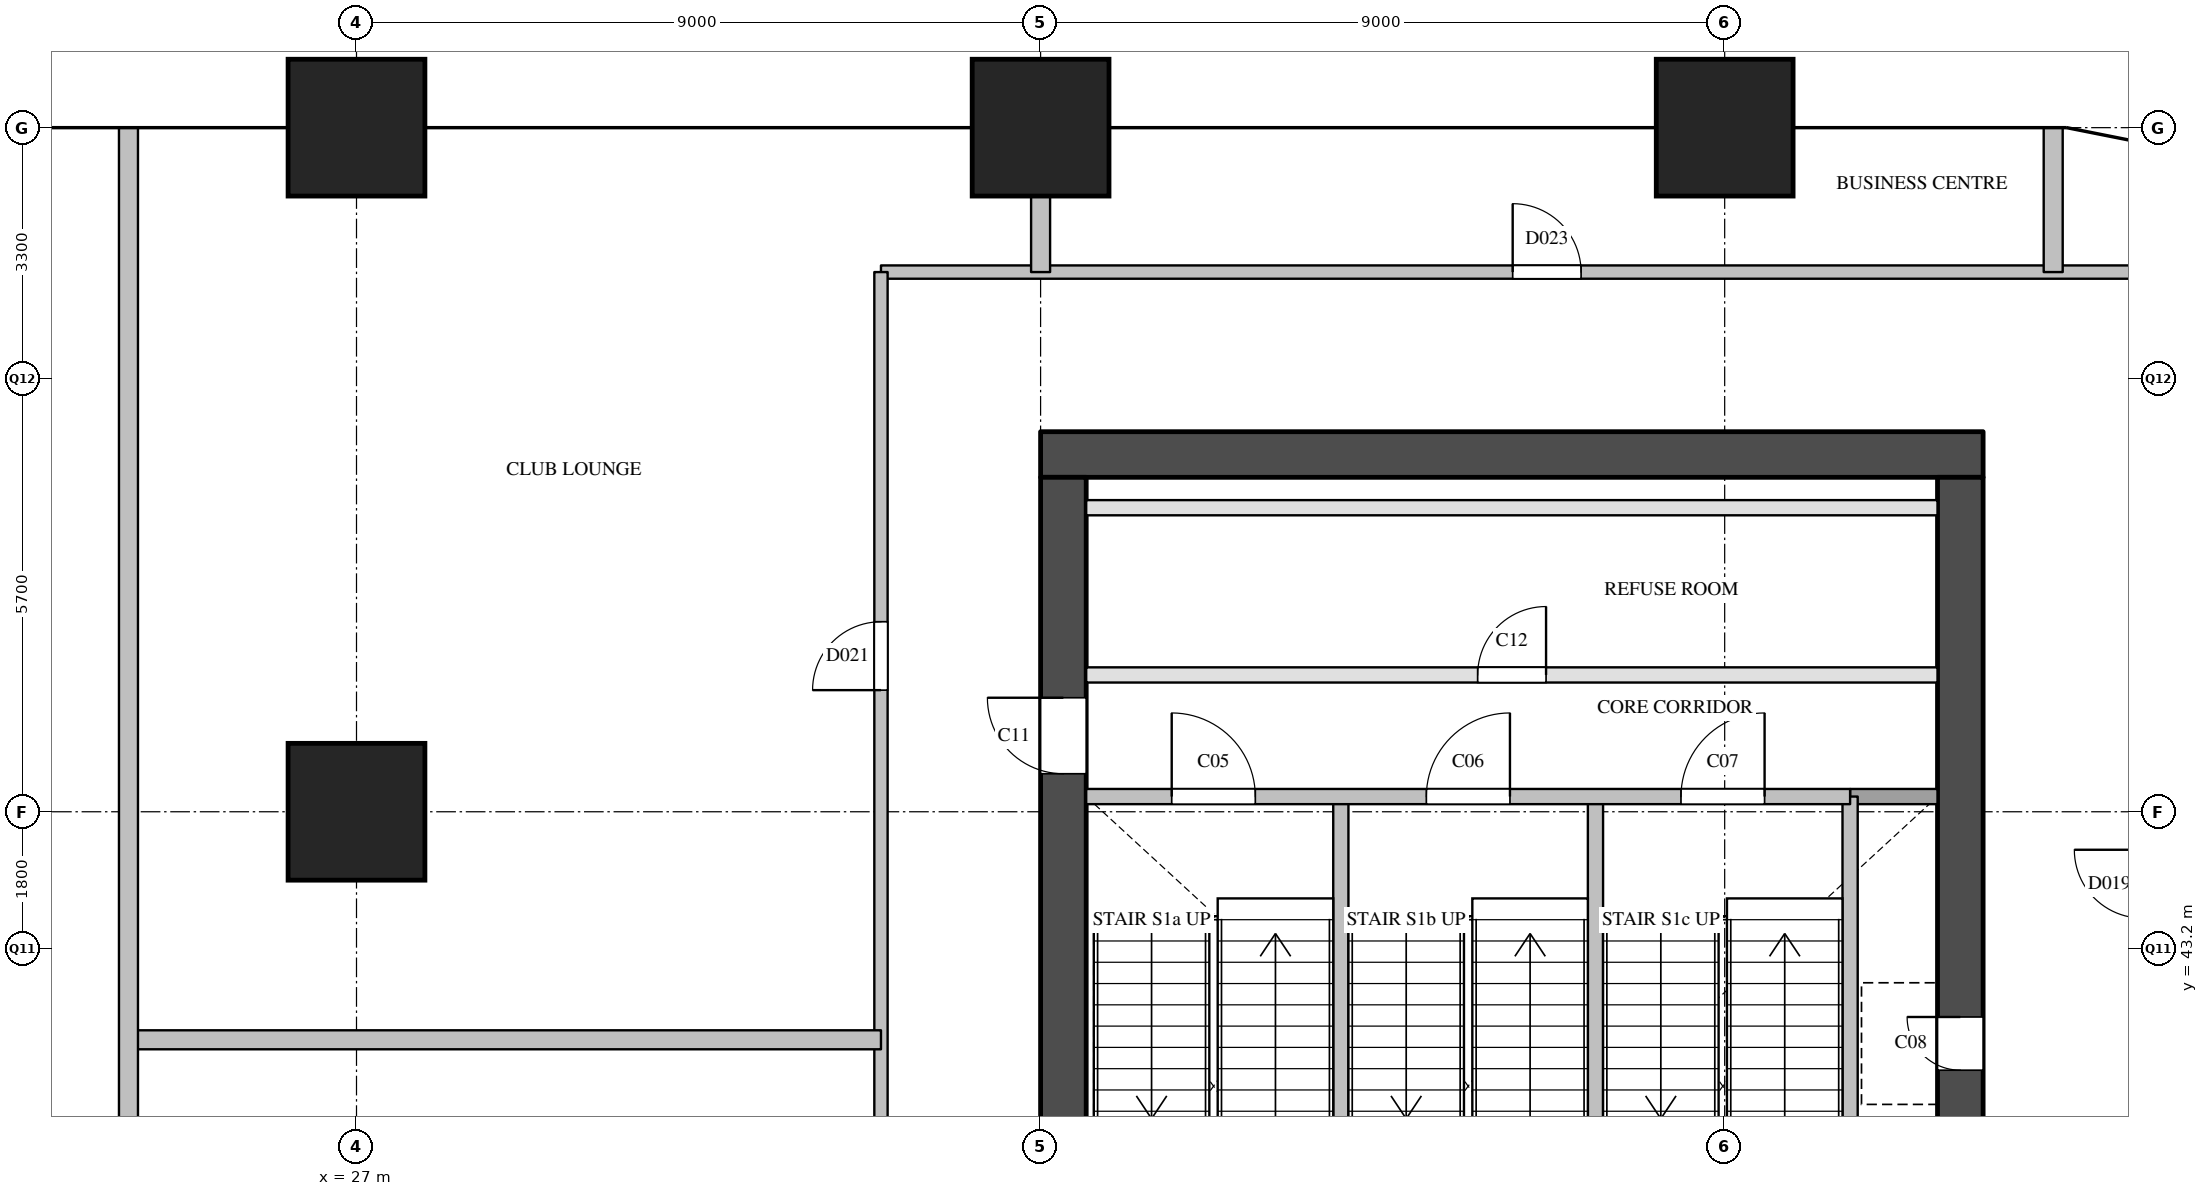
"""IFC4 building model, lengths in metres.
Left out: names, types, materials, properties, quantities, classifications, styles, units other than length and angle.
Written with IfcOpenShell. Run it as: python <this file> out.ifc"""

import sys

from ifc_helpers import new_model, si_unit, direction, frame, frame_2d, origin, origin_2d, place, context, subcontext, project, spatial, rectangle, extrude, element, fill, save


model = new_model("IFC4")
c1 = context("Model", 3, precision=1e-05, world=origin(), true_north=direction((0.0, 1.0)))
c2 = subcontext(c1, "Body", "Model", "MODEL_VIEW")
j1 = project(units=[si_unit("LENGTHUNIT", "METRE"), si_unit("PLANEANGLEUNIT", "RADIAN")], contexts=[c1])
p1 = place(None, origin())
s1 = spatial("IfcSite", under=j1, at=p1, CompositionType="ELEMENT")
p2 = place(p1, origin())
s2 = spatial("IfcBuilding", under=s1, at=p2, CompositionType="ELEMENT")
p3 = place(p2, frame((0.0, 0.0, 93.0)))
s3 = spatial("IfcBuildingStorey", under=s2, at=p3, CompositionType="ELEMENT", Elevation=93.0)
for number, where, z_axis, x_axis in (
    (1, (27.0, 45.0, 0.0), (0.0, 0.0, 1.0), (1.0, 0.0, 0.0)),
    (2, (27.0, 54.0, 0.0), (0.0, 0.0, 1.0), (1.0, 0.0, 0.0)),
    (3, (36.0, 54.0, 0.0), (0.0, 0.0, 1.0), (1.0, 0.0, 0.0)),
    (4, (45.0, 54.0, 0.0), (0.0, 0.0, 1.0), (1.0, 0.0, 0.0)),
):
    element("IfcColumn", number, at=place(p3, frame(where, z_axis=z_axis, x_axis=x_axis)), inside=s3, PredefinedType="COLUMN", context=c2, shape_type="SweptSolid", body=[
        extrude(rectangle(XDim=1.8, YDim=1.8, at=origin_2d()), origin(), (0.0, 0.0, 1.0), 3.8),
    ])
p4 = place(p3, frame((36.0, 49.7, 0.0), z_axis=(0.0, 0.0, 1.0), x_axis=(1.0, 0.0, 0.0)))
e5 = element("IfcWall", 5, at=p4, inside=s3, PredefinedType="SHEAR", context=c2, shape_type="SweptSolid", body=[
    extrude(rectangle(XDim=12.4, YDim=0.6, at=frame_2d((6.2, 0.0))), origin(), (0.0, 0.0, 1.0), 3.5),
])
p5 = place(p3, frame((36.3, 29.1, 0.0), z_axis=(0.0, 0.0, 1.0), x_axis=(0.0, 1.0, 0.0)))
e6 = element("IfcWall", 6, at=p5, inside=s3, PredefinedType="SHEAR", context=c2, shape_type="SweptSolid", body=[
    extrude(rectangle(XDim=20.3, YDim=0.6, at=frame_2d((10.15, 0.0))), origin(), (0.0, 0.0, 1.0), 3.5),
])
p6 = place(p5, frame((3.6, 0.0, 0.0)))
e7 = element("IfcOpeningElement", 7, at=p6, cuts=e6, PredefinedType="OPENING", context=c2, shape_type="SweptSolid", body=[
    extrude(rectangle(XDim=1.8, YDim=2.1, at=frame_2d((0.9, 1.05))), frame((0.0, 0.31, 0.0), z_axis=(0.0, -1.0, 0.0), x_axis=(1.0, 0.0, 0.0)), (0.0, 0.0, 1.0), 0.62),
])
p7 = place(p5, frame((16.4, 0.0, 0.0)))
e8 = element("IfcOpeningElement", 8, at=p7, cuts=e6, PredefinedType="OPENING", context=c2, shape_type="SweptSolid", body=[
    extrude(rectangle(XDim=1.0, YDim=2.1, at=frame_2d((0.5, 1.05))), frame((0.0, 0.31, 0.0), z_axis=(0.0, -1.0, 0.0), x_axis=(1.0, 0.0, 0.0)), (0.0, 0.0, 1.0), 0.62),
])
p8 = place(p3, frame((48.1, 29.1, 0.0), z_axis=(0.0, 0.0, 1.0), x_axis=(0.0, 1.0, 0.0)))
e9 = element("IfcWall", 9, at=p8, inside=s3, PredefinedType="SHEAR", context=c2, shape_type="SweptSolid", body=[
    extrude(rectangle(XDim=20.3, YDim=0.6, at=frame_2d((10.15, 0.0))), origin(), (0.0, 0.0, 1.0), 3.5),
])
p9 = place(p8, frame((12.5, 0.0, 0.0)))
e10 = element("IfcOpeningElement", 10, at=p9, cuts=e9, PredefinedType="OPENING", context=c2, shape_type="SweptSolid", body=[
    extrude(rectangle(XDim=0.7, YDim=2.1, at=frame_2d((0.35, 1.05))), frame((0.0, 0.31, 0.0), z_axis=(0.0, -1.0, 0.0), x_axis=(1.0, 0.0, 0.0)), (0.0, 0.0, 1.0), 0.62),
])
p10 = place(p8, frame((3.9, 0.0, 0.0)))
e11 = element("IfcOpeningElement", 11, at=p10, cuts=e9, PredefinedType="OPENING", context=c2, shape_type="SweptSolid", body=[
    extrude(rectangle(XDim=1.8, YDim=2.1, at=frame_2d((0.9, 1.05))), frame((0.0, 0.31, 0.0), z_axis=(0.0, -1.0, 0.0), x_axis=(1.0, 0.0, 0.0)), (0.0, 0.0, 1.0), 0.62),
])
for number, where, z_axis, x_axis in (
    (12, (39.95, 40.78, 0.0), (0.0, 0.0, 1.0), (0.0, 1.0, 0.0)),
    (13, (43.3, 40.78, 0.0), (0.0, 0.0, 1.0), (0.0, 1.0, 0.0)),
    (14, (46.65, 40.78, 0.0), (0.0, 0.0, 1.0), (0.0, 1.0, 0.0)),
):
    element("IfcWall", number, at=place(p3, frame(where, z_axis=z_axis, x_axis=x_axis)), inside=s3, PredefinedType="SOLIDWALL", context=c2, shape_type="SweptSolid", body=[
        extrude(rectangle(XDim=4.42, YDim=0.2, at=frame_2d((2.21, 0.0))), origin(), (0.0, 0.0, 1.0), 3.5),
    ])
p11 = place(p3, frame((46.65, 45.2, 0.0), z_axis=(0.0, 0.0, 1.0), x_axis=(1.0, 0.0, 0.0)))
e15 = element("IfcWall", 15, at=p11, inside=s3, PredefinedType="SOLIDWALL", context=c2, shape_type="SweptSolid", body=[
    extrude(rectangle(XDim=1.15, YDim=0.2, at=frame_2d((0.575, 0.0))), origin(), (0.0, 0.0, 1.0), 3.5),
])
p12 = place(p3, frame((36.6, 45.2, 0.0), z_axis=(0.0, 0.0, 1.0), x_axis=(1.0, 0.0, 0.0)))
e16 = element("IfcWall", 16, at=p12, inside=s3, PredefinedType="SOLIDWALL", context=c2, shape_type="SweptSolid", body=[
    extrude(rectangle(XDim=10.05, YDim=0.2, at=frame_2d((5.025, 0.0))), origin(), (0.0, 0.0, 1.0), 3.5),
])
p13 = place(p12, frame((1.125, 0.0, 0.0)))
e17 = element("IfcOpeningElement", 17, at=p13, cuts=e16, PredefinedType="OPENING", context=c2, shape_type="SweptSolid", body=[
    extrude(rectangle(XDim=1.1, YDim=2.1, at=frame_2d((0.55, 1.05))), frame((0.0, 0.11, 0.0), z_axis=(0.0, -1.0, 0.0), x_axis=(1.0, 0.0, 0.0)), (0.0, 0.0, 1.0), 0.22),
])
p14 = place(p12, frame((4.475, 0.0, 0.0)))
e18 = element("IfcOpeningElement", 18, at=p14, cuts=e16, PredefinedType="OPENING", context=c2, shape_type="SweptSolid", body=[
    extrude(rectangle(XDim=1.1, YDim=2.1, at=frame_2d((0.55, 1.05))), frame((0.0, 0.11, 0.0), z_axis=(0.0, -1.0, 0.0), x_axis=(1.0, 0.0, 0.0)), (0.0, 0.0, 1.0), 0.22),
])
p15 = place(p12, frame((7.825, 0.0, 0.0)))
e19 = element("IfcOpeningElement", 19, at=p15, cuts=e16, PredefinedType="OPENING", context=c2, shape_type="SweptSolid", body=[
    extrude(rectangle(XDim=1.1, YDim=2.1, at=frame_2d((0.55, 1.05))), frame((0.0, 0.11, 0.0), z_axis=(0.0, -1.0, 0.0), x_axis=(1.0, 0.0, 0.0)), (0.0, 0.0, 1.0), 0.22),
])
p16 = place(p3, frame((36.6, 46.8, 0.0), z_axis=(0.0, 0.0, 1.0), x_axis=(1.0, 0.0, 0.0)))
e20 = element("IfcWall", 20, at=p16, inside=s3, PredefinedType="PARTITIONING", context=c2, shape_type="SweptSolid", body=[
    extrude(rectangle(XDim=11.2, YDim=0.2, at=frame_2d((5.6, 0.0))), origin(), (0.0, 0.0, 1.0), 3.5),
])
p17 = place(p16, frame((5.15, 0.0, 0.0)))
e21 = element("IfcOpeningElement", 21, at=p17, cuts=e20, PredefinedType="OPENING", context=c2, shape_type="SweptSolid", body=[
    extrude(rectangle(XDim=0.9, YDim=2.1, at=frame_2d((0.45, 1.05))), frame((0.0, 0.11, 0.0), z_axis=(0.0, -1.0, 0.0), x_axis=(1.0, 0.0, 0.0)), (0.0, 0.0, 1.0), 0.22),
])
p18 = place(p3, frame((36.6, 49.0, 0.0), z_axis=(0.0, 0.0, 1.0), x_axis=(1.0, 0.0, 0.0)))
e22 = element("IfcWall", 22, at=p18, inside=s3, PredefinedType="PARTITIONING", context=c2, shape_type="SweptSolid", body=[
    extrude(rectangle(XDim=11.2, YDim=0.2, at=frame_2d((5.6, 0.0))), origin(), (0.0, 0.0, 1.0), 3.5),
])
p19 = place(p3, frame((33.9, 52.1, 0.0), z_axis=(0.0, 0.0, 1.0), x_axis=(1.0, 0.0, 0.0)))
e23 = element("IfcWall", 23, at=p19, inside=s3, PredefinedType="PARTITIONING", context=c2, shape_type="SweptSolid", body=[
    extrude(rectangle(XDim=16.6, YDim=0.175, at=frame_2d((8.3, 0.0))), origin(), (0.0, 0.0, 1.0), 3.5),
])
p20 = place(p19, frame((8.311, 0.0, 0.0)))
e24 = element("IfcOpeningElement", 24, at=p20, cuts=e23, PredefinedType="OPENING", context=c2, shape_type="SweptSolid", body=[
    extrude(rectangle(XDim=0.9, YDim=2.1, at=frame_2d((0.45, 1.05))), frame((0.0, 0.097, 0.0), z_axis=(0.0, -1.0, 0.0), x_axis=(1.0, 0.0, 0.0)), (0.0, 0.0, 1.0), 0.195),
])
p21 = place(p3, frame((33.9, 28.52, 0.0), z_axis=(0.0, 0.0, 1.0), x_axis=(0.0, 1.0, 0.0)))
e25 = element("IfcWall", 25, at=p21, inside=s3, PredefinedType="PARTITIONING", context=c2, shape_type="SweptSolid", body=[
    extrude(rectangle(XDim=23.58, YDim=0.175, at=frame_2d((11.79, 0.0))), origin(), (0.0, 0.0, 1.0), 3.5),
])
p22 = place(p21, frame((3.24, 0.0, 0.0)))
e26 = element("IfcOpeningElement", 26, at=p22, cuts=e25, PredefinedType="OPENING", context=c2, shape_type="SweptSolid", body=[
    extrude(rectangle(XDim=1.0, YDim=2.1, at=frame_2d((0.5, 1.05))), frame((0.0, 0.097, 0.0), z_axis=(0.0, -1.0, 0.0), x_axis=(1.0, 0.0, 0.0)), (0.0, 0.0, 1.0), 0.195),
])
p23 = place(p21, frame((9.98, 0.0, 0.0)))
e27 = element("IfcOpeningElement", 27, at=p23, cuts=e25, PredefinedType="OPENING", context=c2, shape_type="SweptSolid", body=[
    extrude(rectangle(XDim=1.0, YDim=2.1, at=frame_2d((0.5, 1.05))), frame((0.0, 0.097, 0.0), z_axis=(0.0, -1.0, 0.0), x_axis=(1.0, 0.0, 0.0)), (0.0, 0.0, 1.0), 0.195),
])
p24 = place(p21, frame((18.08, 0.0, 0.0)))
e28 = element("IfcOpeningElement", 28, at=p24, cuts=e25, PredefinedType="OPENING", context=c2, shape_type="SweptSolid", body=[
    extrude(rectangle(XDim=0.9, YDim=2.1, at=frame_2d((0.45, 1.05))), frame((0.0, 0.097, 0.0), z_axis=(0.0, -1.0, 0.0), x_axis=(1.0, 0.0, 0.0)), (0.0, 0.0, 1.0), 0.195),
])
p25 = place(p3, frame((24.0, 42.0, 0.0), z_axis=(0.0, 0.0, 1.0), x_axis=(1.0, 0.0, 0.0)))
e29 = element("IfcWall", 29, at=p25, inside=s3, PredefinedType="PARTITIONING", context=c2, shape_type="SweptSolid", body=[
    extrude(rectangle(XDim=9.9, YDim=0.25, at=frame_2d((4.95, 0.0))), origin(), (0.0, 0.0, 1.0), 2.5),
])
p26 = place(p3, frame((24.0, 36.0, 0.0), z_axis=(0.0, 0.0, 1.0), x_axis=(0.0, 1.0, 0.0)))
e30 = element("IfcWall", 30, at=p26, inside=s3, PredefinedType="PARTITIONING", context=c2, shape_type="SweptSolid", body=[
    extrude(rectangle(XDim=18.0, YDim=0.25, at=frame_2d((9.0, 0.0))), origin(), (0.0, 0.0, 1.0), 2.5),
])
p27 = place(p3, frame((36.0, 52.1, 0.0), z_axis=(0.0, 0.0, 1.0), x_axis=(0.0, 1.0, 0.0)))
e31 = element("IfcWall", 31, at=p27, inside=s3, PredefinedType="PARTITIONING", context=c2, shape_type="SweptSolid", body=[
    extrude(rectangle(XDim=1.9, YDim=0.25, at=frame_2d((0.95, 0.0))), origin(), (0.0, 0.0, 1.0), 3.5),
])
p28 = place(p3, frame((49.322, 52.1, 0.0), z_axis=(0.0, 0.0, 1.0), x_axis=(0.0, 1.0, 0.0)))
e32 = element("IfcWall", 32, at=p28, inside=s3, PredefinedType="PARTITIONING", context=c2, shape_type="SweptSolid", body=[
    extrude(rectangle(XDim=1.9, YDim=0.25, at=frame_2d((0.95, 0.0))), origin(), (0.0, 0.0, 1.0), 2.5),
])
p29 = place(p13, origin())
e33 = element("IfcDoor", 33, at=p29, inside=s3, OperationType="SINGLE_SWING_LEFT", PredefinedType="DOOR", context=c2, shape_type="SweptSolid", body=[
    extrude(rectangle(XDim=1.1, YDim=2.1, at=frame_2d((0.55, 1.05))), frame((0.0, 0.025, 0.0), z_axis=(0.0, -1.0, 0.0), x_axis=(1.0, 0.0, 0.0)), (0.0, 0.0, 1.0), 0.05),
])
fill(e17, e33)
p30 = place(p14, origin())
e34 = element("IfcDoor", 34, at=p30, inside=s3, OperationType="SINGLE_SWING_RIGHT", PredefinedType="DOOR", context=c2, shape_type="SweptSolid", body=[
    extrude(rectangle(XDim=1.1, YDim=2.1, at=frame_2d((0.55, 1.05))), frame((0.0, 0.025, 0.0), z_axis=(0.0, -1.0, 0.0), x_axis=(1.0, 0.0, 0.0)), (0.0, 0.0, 1.0), 0.05),
])
fill(e18, e34)
p31 = place(p15, origin())
e35 = element("IfcDoor", 35, at=p31, inside=s3, OperationType="SINGLE_SWING_RIGHT", PredefinedType="DOOR", context=c2, shape_type="SweptSolid", body=[
    extrude(rectangle(XDim=1.1, YDim=2.1, at=frame_2d((0.55, 1.05))), frame((0.0, 0.025, 0.0), z_axis=(0.0, -1.0, 0.0), x_axis=(1.0, 0.0, 0.0)), (0.0, 0.0, 1.0), 0.05),
])
fill(e19, e35)
p32 = place(p9, origin())
e36 = element("IfcDoor", 36, at=p32, inside=s3, OperationType="SINGLE_SWING_RIGHT", PredefinedType="DOOR", context=c2, shape_type="SweptSolid", body=[
    extrude(rectangle(XDim=0.7, YDim=2.1, at=frame_2d((0.35, 1.05))), frame((0.0, 0.025, 0.0), z_axis=(0.0, -1.0, 0.0), x_axis=(1.0, 0.0, 0.0)), (0.0, 0.0, 1.0), 0.05),
])
fill(e10, e36)
p33 = place(p7, origin())
e37 = element("IfcDoor", 37, at=p33, inside=s3, OperationType="SINGLE_SWING_RIGHT", PredefinedType="DOOR", context=c2, shape_type="SweptSolid", body=[
    extrude(rectangle(XDim=1.0, YDim=2.1, at=frame_2d((0.5, 1.05))), frame((0.0, 0.025, 0.0), z_axis=(0.0, -1.0, 0.0), x_axis=(1.0, 0.0, 0.0)), (0.0, 0.0, 1.0), 0.05),
])
fill(e8, e37)
p34 = place(p17, origin())
e38 = element("IfcDoor", 38, at=p34, inside=s3, OperationType="SINGLE_SWING_RIGHT", PredefinedType="DOOR", context=c2, shape_type="SweptSolid", body=[
    extrude(rectangle(XDim=0.9, YDim=2.1, at=frame_2d((0.45, 1.05))), frame((0.0, 0.025, 0.0), z_axis=(0.0, -1.0, 0.0), x_axis=(1.0, 0.0, 0.0)), (0.0, 0.0, 1.0), 0.05),
])
fill(e21, e38)
p35 = place(p24, origin())
e39 = element("IfcDoor", 39, at=p35, inside=s3, OperationType="SINGLE_SWING_LEFT", PredefinedType="DOOR", context=c2, shape_type="SweptSolid", body=[
    extrude(rectangle(XDim=0.9, YDim=2.1, at=frame_2d((0.45, 1.05))), frame((0.0, 0.025, 0.0), z_axis=(0.0, -1.0, 0.0), x_axis=(1.0, 0.0, 0.0)), (0.0, 0.0, 1.0), 0.05),
])
fill(e28, e39)
p36 = place(p20, origin())
e40 = element("IfcDoor", 40, at=p36, inside=s3, OperationType="SINGLE_SWING_LEFT", PredefinedType="DOOR", context=c2, shape_type="SweptSolid", body=[
    extrude(rectangle(XDim=0.9, YDim=2.1, at=frame_2d((0.45, 1.05))), frame((0.0, 0.025, 0.0), z_axis=(0.0, -1.0, 0.0), x_axis=(1.0, 0.0, 0.0)), (0.0, 0.0, 1.0), 0.05),
])
fill(e24, e40)
save(model, sys.argv[1])
